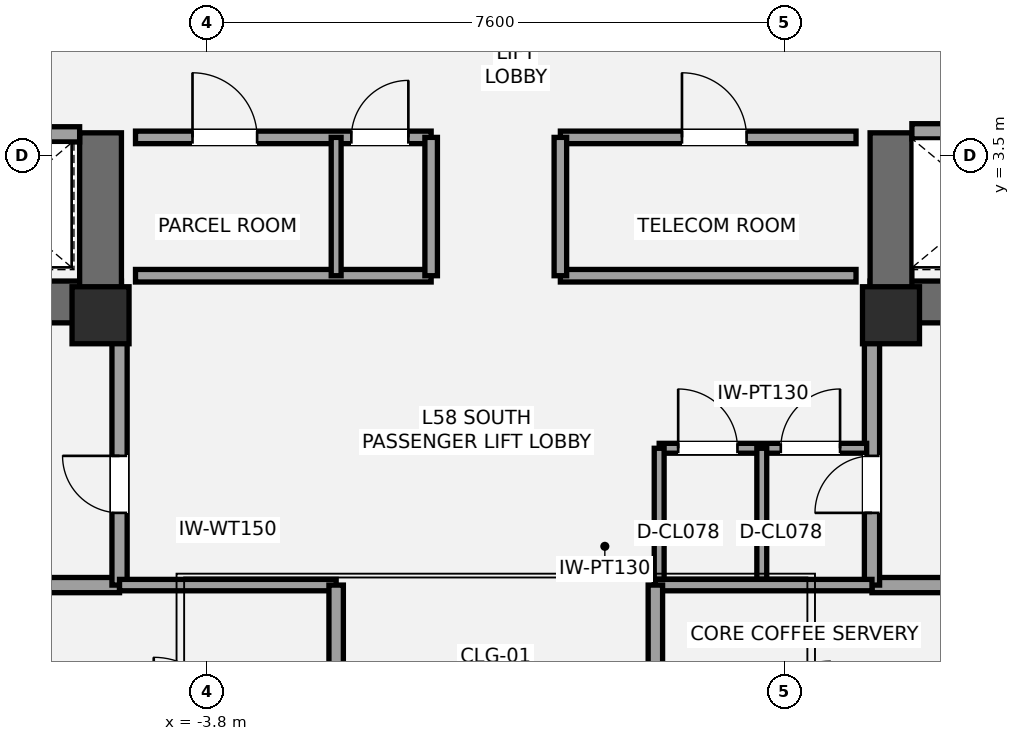
"""IFC4 building model, lengths in metres.
Left out: names, types, materials, properties, quantities, classifications, styles, units other than length and angle.
Written with IfcOpenShell. Run it as: python <this file> out.ifc"""

import sys

from ifc_helpers import new_model, si_unit, direction, frame, frame_2d, origin, origin_2d, place, context, subcontext, project, spatial, rectangle, extrude, element, fill, save


model = new_model("IFC4")
c1 = context("Model", 3, precision=1e-05, world=origin(), true_north=direction((0.0, 1.0)))
c2 = subcontext(c1, "Body", "Model", "MODEL_VIEW")
j1 = project(units=[si_unit("LENGTHUNIT", "METRE"), si_unit("PLANEANGLEUNIT", "RADIAN")], contexts=[c1])
p1 = place(None, origin())
s1 = spatial("IfcSite", under=j1, at=p1, CompositionType="ELEMENT")
p2 = place(p1, origin())
s2 = spatial("IfcBuilding", under=s1, at=p2, CompositionType="ELEMENT")
p3 = place(p2, frame((0.0, 0.0, 210.0)))
s3 = spatial("IfcBuildingStorey", under=s2, at=p3, CompositionType="ELEMENT", Elevation=210.0)
p4 = place(p3, frame((-4.925, 1.575, 0.0), z_axis=(0.0, 0.0, 1.0), x_axis=(-1.0, 0.0, 0.0)))
e1 = element("IfcWall", 1, at=p4, inside=s3, PredefinedType="SHEAR", context=c2, shape_type="SweptSolid", body=[
    extrude(rectangle(XDim=8.775, YDim=0.55, at=frame_2d((4.387, 0.0))), origin(), (0.0, 0.0, 1.0), 3.15),
])
p5 = place(p4, frame((5.375, 0.0, 0.0)))
e2 = element("IfcOpeningElement", 2, at=p5, cuts=e1, PredefinedType="OPENING", context=c2, shape_type="SweptSolid", body=[
    extrude(rectangle(XDim=1.05, YDim=2.15, at=frame_2d((0.525, 1.075))), frame((0.0, 0.285, 0.0), z_axis=(0.0, -1.0, 0.0), x_axis=(1.0, 0.0, 0.0)), (0.0, 0.0, 1.0), 0.57),
])
p6 = place(p4, frame((3.705, 0.0, 0.0)))
e3 = element("IfcOpeningElement", 3, at=p6, cuts=e1, PredefinedType="OPENING", context=c2, shape_type="SweptSolid", body=[
    extrude(rectangle(XDim=1.1, YDim=2.2, at=frame_2d((0.55, 1.1))), frame((0.0, 0.285, 0.0), z_axis=(0.0, -1.0, 0.0), x_axis=(1.0, 0.0, 0.0)), (0.0, 0.0, 1.0), 0.57),
])
p7 = place(p3, frame((-5.2, 1.3, 0.0), z_axis=(0.0, 0.0, 1.0), x_axis=(0.0, 1.0, 0.0)))
e4 = element("IfcWall", 4, at=p7, inside=s3, PredefinedType="SHEAR", context=c2, shape_type="SweptSolid", body=[
    extrude(rectangle(XDim=2.5, YDim=0.55, at=frame_2d((1.25, 0.0))), origin(), (0.0, 0.0, 1.0), 3.15),
])
p8 = place(p3, frame((13.7, 1.575, 0.0), z_axis=(0.0, 0.0, 1.0), x_axis=(-1.0, 0.0, 0.0)))
e5 = element("IfcWall", 5, at=p8, inside=s3, PredefinedType="SHEAR", context=c2, shape_type="SweptSolid", body=[
    extrude(rectangle(XDim=8.775, YDim=0.55, at=frame_2d((4.387, 0.0))), origin(), (0.0, 0.0, 1.0), 3.15),
])
p9 = place(p8, frame((2.35, 0.0, 0.0)))
e6 = element("IfcOpeningElement", 6, at=p9, cuts=e5, PredefinedType="OPENING", context=c2, shape_type="SweptSolid", body=[
    extrude(rectangle(XDim=1.05, YDim=2.15, at=frame_2d((0.525, 1.075))), frame((0.0, 0.285, 0.0), z_axis=(0.0, -1.0, 0.0), x_axis=(1.0, 0.0, 0.0)), (0.0, 0.0, 1.0), 0.57),
])
p10 = place(p8, frame((4.35, 0.0, 0.0)))
e7 = element("IfcOpeningElement", 7, at=p10, cuts=e5, PredefinedType="OPENING", context=c2, shape_type="SweptSolid", body=[
    extrude(rectangle(XDim=1.1, YDim=2.2, at=frame_2d((0.55, 1.1))), frame((0.0, 0.285, 0.0), z_axis=(0.0, -1.0, 0.0), x_axis=(1.0, 0.0, 0.0)), (0.0, 0.0, 1.0), 0.57),
])
p11 = place(p3, frame((5.2, 1.3, 0.0), z_axis=(0.0, 0.0, 1.0), x_axis=(0.0, 1.0, 0.0)))
e8 = element("IfcWall", 8, at=p11, inside=s3, PredefinedType="SHEAR", context=c2, shape_type="SweptSolid", body=[
    extrude(rectangle(XDim=2.5, YDim=0.55, at=frame_2d((1.25, 0.0))), origin(), (0.0, 0.0, 1.0), 3.15),
])
for number, where, z_axis, x_axis in (
    (9, (-5.2, 1.4, 0.0), (0.0, 0.0, 1.0), (1.0, 0.0, 0.0)),
    (10, (5.2, 1.4, 0.0), (0.0, 0.0, 1.0), (1.0, 0.0, 0.0)),
):
    element("IfcColumn", number, at=place(p3, frame(where, z_axis=z_axis, x_axis=x_axis)), inside=s3, PredefinedType="PILASTER", context=c2, shape_type="SweptSolid", body=[
        extrude(rectangle(XDim=0.75, YDim=0.75, at=origin_2d()), origin(), (0.0, 0.0, 1.0), 3.15),
    ])
p12 = place(p3, frame((-7.2, -2.15, 0.0), z_axis=(0.0, 0.0, 1.0), x_axis=(1.0, 0.0, 0.0)))
e11 = element("IfcWall", 11, at=p12, inside=s3, PredefinedType="SOLIDWALL", context=c2, shape_type="SweptSolid", body=[
    extrude(rectangle(XDim=2.25, YDim=0.2, at=frame_2d((1.125, 0.0))), origin(), (0.0, 0.0, 1.0), 2.423),
])
p13 = place(p3, frame((-4.95, -2.15, 0.0), z_axis=(0.0, 0.0, 1.0), x_axis=(0.0, 1.0, 0.0)))
e12 = element("IfcWall", 12, at=p13, inside=s3, PredefinedType="SOLIDWALL", context=c2, shape_type="SweptSolid", body=[
    extrude(rectangle(XDim=3.5, YDim=0.2, at=frame_2d((1.75, 0.0))), origin(), (0.0, 0.0, 1.0), 2.423),
])
p14 = place(p13, frame((0.95, 0.0, 0.0)))
e13 = element("IfcOpeningElement", 13, at=p14, cuts=e12, PredefinedType="OPENING", context=c2, shape_type="SweptSolid", body=[
    extrude(rectangle(XDim=0.75, YDim=2.1, at=frame_2d((0.375, 1.05))), frame((0.0, 0.11, 0.0), z_axis=(0.0, -1.0, 0.0), x_axis=(1.0, 0.0, 0.0)), (0.0, 0.0, 1.0), 0.22),
])
p15 = place(p3, frame((4.95, -2.15, 0.0), z_axis=(0.0, 0.0, 1.0), x_axis=(1.0, 0.0, 0.0)))
e14 = element("IfcWall", 14, at=p15, inside=s3, PredefinedType="SOLIDWALL", context=c2, shape_type="SweptSolid", body=[
    extrude(rectangle(XDim=2.25, YDim=0.2, at=frame_2d((1.125, 0.0))), origin(), (0.0, 0.0, 1.0), 2.97),
])
p16 = place(p3, frame((4.95, -2.15, 0.0), z_axis=(0.0, 0.0, 1.0), x_axis=(0.0, 1.0, 0.0)))
e15 = element("IfcWall", 15, at=p16, inside=s3, PredefinedType="SOLIDWALL", context=c2, shape_type="SweptSolid", body=[
    extrude(rectangle(XDim=3.5, YDim=0.2, at=frame_2d((1.75, 0.0))), origin(), (0.0, 0.0, 1.0), 2.423),
])
p17 = place(p16, frame((0.95, 0.0, 0.0)))
e16 = element("IfcOpeningElement", 16, at=p17, cuts=e15, PredefinedType="OPENING", context=c2, shape_type="SweptSolid", body=[
    extrude(rectangle(XDim=0.75, YDim=2.1, at=frame_2d((0.375, 1.05))), frame((0.0, 0.11, 0.0), z_axis=(0.0, -1.0, 0.0), x_axis=(1.0, 0.0, 0.0)), (0.0, 0.0, 1.0), 0.22),
])
p18 = place(p3, frame((2.15, -0.35, 0.0), z_axis=(0.0, 0.0, 1.0), x_axis=(1.0, 0.0, 0.0)))
e17 = element("IfcWall", 17, at=p18, inside=s3, PredefinedType="PARTITIONING", context=c2, shape_type="SweptSolid", body=[
    extrude(rectangle(XDim=2.73, YDim=0.13, at=frame_2d((1.365, 0.0))), origin(), (0.0, 0.0, 1.0), 2.97),
])
p19 = place(p18, frame((0.25, 0.0, 0.0)))
e18 = element("IfcOpeningElement", 18, at=p19, cuts=e17, PredefinedType="OPENING", context=c2, shape_type="SweptSolid", body=[
    extrude(rectangle(XDim=0.78, YDim=2.1, at=frame_2d((0.39, 1.05))), frame((0.0, 0.075, 0.0), z_axis=(0.0, -1.0, 0.0), x_axis=(1.0, 0.0, 0.0)), (0.0, 0.0, 1.0), 0.15),
])
p20 = place(p18, frame((1.6, 0.0, 0.0)))
e19 = element("IfcOpeningElement", 19, at=p20, cuts=e17, PredefinedType="OPENING", context=c2, shape_type="SweptSolid", body=[
    extrude(rectangle(XDim=0.78, YDim=2.1, at=frame_2d((0.39, 1.05))), frame((0.0, 0.075, 0.0), z_axis=(0.0, -1.0, 0.0), x_axis=(1.0, 0.0, 0.0)), (0.0, 0.0, 1.0), 0.15),
])
for number, where, z_axis, x_axis in (
    (20, (2.15, -2.15, 0.0), (0.0, 0.0, 1.0), (0.0, 1.0, 0.0)),
    (21, (3.5, -2.15, 0.0), (0.0, 0.0, 1.0), (0.0, 1.0, 0.0)),
):
    element("IfcWall", number, at=place(p3, frame(where, z_axis=z_axis, x_axis=x_axis)), inside=s3, PredefinedType="PARTITIONING", context=c2, shape_type="SweptSolid", body=[
        extrude(rectangle(XDim=1.8, YDim=0.13, at=frame_2d((0.9, 0.0))), origin(), (0.0, 0.0, 1.0), 2.97),
    ])
p21 = place(p3, frame((-9.78, 3.78, 0.0), z_axis=(0.0, 0.0, 1.0), x_axis=(1.0, 0.0, 0.0)))
e22 = element("IfcWall", 22, at=p21, inside=s3, PredefinedType="SOLIDWALL", context=c2, shape_type="SweptSolid", body=[
    extrude(rectangle(XDim=4.305, YDim=0.2, at=frame_2d((2.152, 0.0))), origin(), (0.0, 0.0, 1.0), 2.97),
])
p22 = place(p21, frame((2.72, 0.0, 0.0)))
e23 = element("IfcOpeningElement", 23, at=p22, cuts=e22, PredefinedType="OPENING", context=c2, shape_type="SweptSolid", body=[
    extrude(rectangle(XDim=1.1, YDim=2.2, at=frame_2d((0.55, 1.1))), frame((0.0, 0.11, 0.0), z_axis=(0.0, -1.0, 0.0), x_axis=(1.0, 0.0, 0.0)), (0.0, 0.0, 1.0), 0.22),
])
p23 = place(p3, frame((5.475, 3.82, 0.0), z_axis=(0.0, 0.0, 1.0), x_axis=(1.0, 0.0, 0.0)))
e24 = element("IfcWall", 24, at=p23, inside=s3, PredefinedType="SOLIDWALL", context=c2, shape_type="SweptSolid", body=[
    extrude(rectangle(XDim=4.305, YDim=0.2, at=frame_2d((2.152, 0.0))), origin(), (0.0, 0.0, 1.0), 2.97),
])
p24 = place(p23, frame((0.65, 0.0, 0.0)))
e25 = element("IfcOpeningElement", 25, at=p24, cuts=e24, PredefinedType="OPENING", context=c2, shape_type="SweptSolid", body=[
    extrude(rectangle(XDim=1.2, YDim=2.2, at=frame_2d((0.6, 1.1))), frame((0.0, 0.11, 0.0), z_axis=(0.0, -1.0, 0.0), x_axis=(1.0, 0.0, 0.0)), (0.0, 0.0, 1.0), 0.22),
])
p25 = place(p3, frame((-4.74, 1.92, 0.0), z_axis=(0.0, 0.0, 1.0), x_axis=(1.0, 0.0, 0.0)))
e26 = element("IfcWall", 26, at=p25, inside=s3, PredefinedType="PARTITIONING", context=c2, shape_type="SweptSolid", body=[
    extrude(rectangle(XDim=3.89, YDim=0.165, at=frame_2d((1.945, 0.0))), origin(), (0.0, 0.0, 1.0), 2.11),
])
p26 = place(p3, frame((-4.74, 3.74, 0.0), z_axis=(0.0, 0.0, 1.0), x_axis=(1.0, 0.0, 0.0)))
e27 = element("IfcWall", 27, at=p26, inside=s3, PredefinedType="PARTITIONING", context=c2, shape_type="SweptSolid", body=[
    extrude(rectangle(XDim=3.89, YDim=0.165, at=frame_2d((1.945, 0.0))), origin(), (0.0, 0.0, 1.0), 2.97),
])
p27 = place(p26, frame((0.75, 0.0, 0.0)))
e28 = element("IfcOpeningElement", 28, at=p27, cuts=e27, PredefinedType="OPENING", context=c2, shape_type="SweptSolid", body=[
    extrude(rectangle(XDim=0.85, YDim=2.1, at=frame_2d((0.425, 1.05))), frame((0.0, 0.093, 0.0), z_axis=(0.0, -1.0, 0.0), x_axis=(1.0, 0.0, 0.0)), (0.0, 0.0, 1.0), 0.185),
])
p28 = place(p26, frame((2.84, 0.0, 0.0)))
e29 = element("IfcOpeningElement", 29, at=p28, cuts=e27, PredefinedType="OPENING", context=c2, shape_type="SweptSolid", body=[
    extrude(rectangle(XDim=0.75, YDim=2.1, at=frame_2d((0.375, 1.05))), frame((0.0, 0.093, 0.0), z_axis=(0.0, -1.0, 0.0), x_axis=(1.0, 0.0, 0.0)), (0.0, 0.0, 1.0), 0.185),
])
p29 = place(p3, frame((-0.85, 1.92, 0.0), z_axis=(0.0, 0.0, 1.0), x_axis=(0.0, 1.0, 0.0)))
e30 = element("IfcWall", 30, at=p29, inside=s3, PredefinedType="PARTITIONING", context=c2, shape_type="SweptSolid", body=[
    extrude(rectangle(XDim=1.82, YDim=0.165, at=frame_2d((0.91, 0.0))), origin(), (0.0, 0.0, 1.0), 2.97),
])
p30 = place(p3, frame((0.85, 1.92, 0.0), z_axis=(0.0, 0.0, 1.0), x_axis=(1.0, 0.0, 0.0)))
e31 = element("IfcWall", 31, at=p30, inside=s3, PredefinedType="PARTITIONING", context=c2, shape_type="SweptSolid", body=[
    extrude(rectangle(XDim=3.89, YDim=0.165, at=frame_2d((1.945, 0.0))), origin(), (0.0, 0.0, 1.0), 2.11),
])
p31 = place(p3, frame((0.85, 3.74, 0.0), z_axis=(0.0, 0.0, 1.0), x_axis=(1.0, 0.0, 0.0)))
e32 = element("IfcWall", 32, at=p31, inside=s3, PredefinedType="PARTITIONING", context=c2, shape_type="SweptSolid", body=[
    extrude(rectangle(XDim=3.89, YDim=0.165, at=frame_2d((1.945, 0.0))), origin(), (0.0, 0.0, 1.0), 2.97),
])
p32 = place(p31, frame((1.6, 0.0, 0.0)))
e33 = element("IfcOpeningElement", 33, at=p32, cuts=e32, PredefinedType="OPENING", context=c2, shape_type="SweptSolid", body=[
    extrude(rectangle(XDim=0.85, YDim=2.1, at=frame_2d((0.425, 1.05))), frame((0.0, 0.093, 0.0), z_axis=(0.0, -1.0, 0.0), x_axis=(1.0, 0.0, 0.0)), (0.0, 0.0, 1.0), 0.185),
])
p33 = place(p3, frame((0.85, 1.92, 0.0), z_axis=(0.0, 0.0, 1.0), x_axis=(0.0, 1.0, 0.0)))
e34 = element("IfcWall", 34, at=p33, inside=s3, PredefinedType="PARTITIONING", context=c2, shape_type="SweptSolid", body=[
    extrude(rectangle(XDim=1.82, YDim=0.165, at=frame_2d((0.91, 0.0))), origin(), (0.0, 0.0, 1.0), 2.97),
])
p34 = place(p3, frame((-2.1, 1.92, 0.0), z_axis=(0.0, 0.0, 1.0), x_axis=(0.0, 1.0, 0.0)))
e35 = element("IfcWall", 35, at=p34, inside=s3, PredefinedType="PARTITIONING", context=c2, shape_type="SweptSolid", body=[
    extrude(rectangle(XDim=1.82, YDim=0.13, at=frame_2d((0.91, 0.0))), origin(), (0.0, 0.0, 1.0), 2.97),
])
p35 = place(p3, frame((-4.95, -2.15, 0.0), z_axis=(0.0, 0.0, 1.0), x_axis=(1.0, 0.0, 0.0)))
e36 = element("IfcWall", 36, at=p35, inside=s3, PredefinedType="PLUMBINGWALL", context=c2, shape_type="SweptSolid", body=[
    extrude(rectangle(XDim=2.85, YDim=0.15, at=frame_2d((1.425, 0.0))), origin(), (0.0, 0.0, 1.0), 2.97),
])
p36 = place(p3, frame((-2.1, -4.05, 0.0), z_axis=(0.0, 0.0, 1.0), x_axis=(0.0, 1.0, 0.0)))
e37 = element("IfcWall", 37, at=p36, inside=s3, PredefinedType="PLUMBINGWALL", context=c2, shape_type="SweptSolid", body=[
    extrude(rectangle(XDim=1.9, YDim=0.19, at=frame_2d((0.95, 0.0))), origin(), (0.0, 0.0, 1.0), 2.423),
])
p37 = place(p3, frame((2.1, -2.15, 0.0), z_axis=(0.0, 0.0, 1.0), x_axis=(1.0, 0.0, 0.0)))
e38 = element("IfcWall", 38, at=p37, inside=s3, PredefinedType="PLUMBINGWALL", context=c2, shape_type="SweptSolid", body=[
    extrude(rectangle(XDim=2.85, YDim=0.15, at=frame_2d((1.425, 0.0))), origin(), (0.0, 0.0, 1.0), 2.97),
])
p38 = place(p3, frame((2.1, -4.05, 0.0), z_axis=(0.0, 0.0, 1.0), x_axis=(0.0, 1.0, 0.0)))
e39 = element("IfcWall", 39, at=p38, inside=s3, PredefinedType="PLUMBINGWALL", context=c2, shape_type="SweptSolid", body=[
    extrude(rectangle(XDim=1.9, YDim=0.19, at=frame_2d((0.95, 0.0))), origin(), (0.0, 0.0, 1.0), 2.97),
])
p39 = place(p14, origin())
e40 = element("IfcDoor", 40, at=p39, inside=s3, OperationType="SINGLE_SWING_RIGHT", PredefinedType="DOOR", context=c2, shape_type="SweptSolid", body=[
    extrude(rectangle(XDim=0.75, YDim=2.1, at=frame_2d((0.375, 1.05))), frame((0.0, 0.025, 0.0), z_axis=(0.0, -1.0, 0.0), x_axis=(1.0, 0.0, 0.0)), (0.0, 0.0, 1.0), 0.05),
])
fill(e13, e40)
p40 = place(p17, origin())
e41 = element("IfcDoor", 41, at=p40, inside=s3, OperationType="SINGLE_SWING_LEFT", PredefinedType="DOOR", context=c2, shape_type="SweptSolid", body=[
    extrude(rectangle(XDim=0.75, YDim=2.1, at=frame_2d((0.375, 1.05))), frame((0.0, 0.025, 0.0), z_axis=(0.0, -1.0, 0.0), x_axis=(1.0, 0.0, 0.0)), (0.0, 0.0, 1.0), 0.05),
])
fill(e16, e41)
p41 = place(p19, origin())
e42 = element("IfcDoor", 42, at=p41, inside=s3, OperationType="SINGLE_SWING_LEFT", PredefinedType="DOOR", context=c2, shape_type="SweptSolid", body=[
    extrude(rectangle(XDim=0.78, YDim=2.1, at=frame_2d((0.39, 1.05))), frame((0.0, 0.025, 0.0), z_axis=(0.0, -1.0, 0.0), x_axis=(1.0, 0.0, 0.0)), (0.0, 0.0, 1.0), 0.05),
])
fill(e18, e42)
p42 = place(p20, origin())
e43 = element("IfcDoor", 43, at=p42, inside=s3, OperationType="SINGLE_SWING_RIGHT", PredefinedType="DOOR", context=c2, shape_type="SweptSolid", body=[
    extrude(rectangle(XDim=0.78, YDim=2.1, at=frame_2d((0.39, 1.05))), frame((0.0, 0.025, 0.0), z_axis=(0.0, -1.0, 0.0), x_axis=(1.0, 0.0, 0.0)), (0.0, 0.0, 1.0), 0.05),
])
fill(e19, e43)
p43 = place(p27, origin())
e44 = element("IfcDoor", 44, at=p43, inside=s3, OperationType="SINGLE_SWING_LEFT", PredefinedType="DOOR", context=c2, shape_type="SweptSolid", body=[
    extrude(rectangle(XDim=0.85, YDim=2.1, at=frame_2d((0.425, 1.05))), frame((0.0, 0.025, 0.0), z_axis=(0.0, -1.0, 0.0), x_axis=(1.0, 0.0, 0.0)), (0.0, 0.0, 1.0), 0.05),
])
fill(e28, e44)
p44 = place(p28, origin())
e45 = element("IfcDoor", 45, at=p44, inside=s3, OperationType="SINGLE_SWING_RIGHT", PredefinedType="DOOR", context=c2, shape_type="SweptSolid", body=[
    extrude(rectangle(XDim=0.75, YDim=2.1, at=frame_2d((0.375, 1.05))), frame((0.0, 0.025, 0.0), z_axis=(0.0, -1.0, 0.0), x_axis=(1.0, 0.0, 0.0)), (0.0, 0.0, 1.0), 0.05),
])
fill(e29, e45)
p45 = place(p32, origin())
e46 = element("IfcDoor", 46, at=p45, inside=s3, OperationType="SINGLE_SWING_LEFT", PredefinedType="DOOR", context=c2, shape_type="SweptSolid", body=[
    extrude(rectangle(XDim=0.85, YDim=2.1, at=frame_2d((0.425, 1.05))), frame((0.0, 0.025, 0.0), z_axis=(0.0, -1.0, 0.0), x_axis=(1.0, 0.0, 0.0)), (0.0, 0.0, 1.0), 0.05),
])
fill(e33, e46)
save(model, sys.argv[1])
